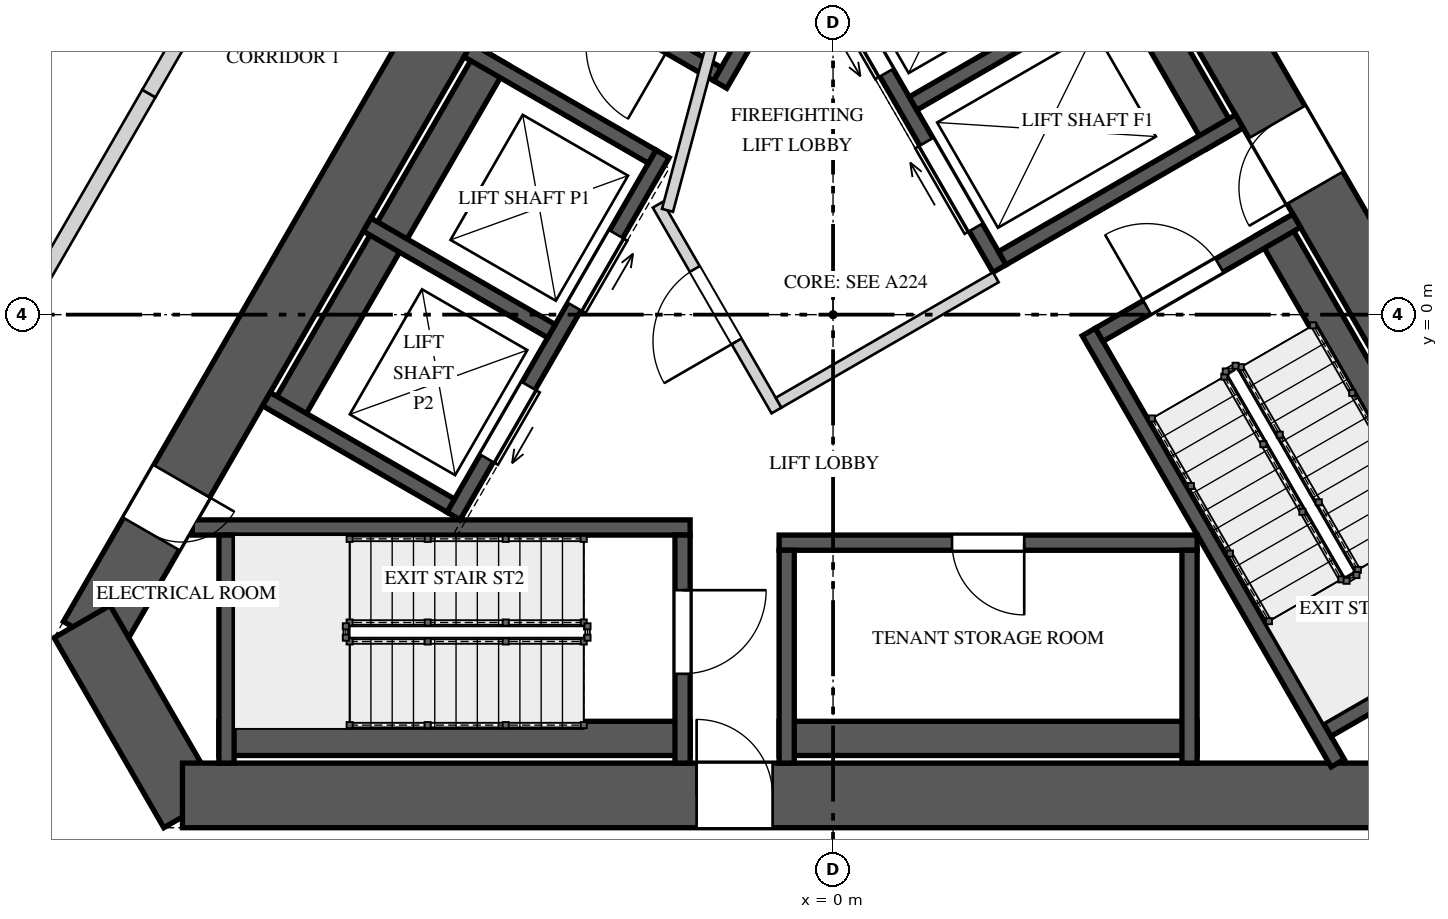
"""IFC4 building model, lengths in metres.
Left out: names, types, materials, properties, quantities, classifications, styles, units other than length and angle.
Written with IfcOpenShell. Run it as: python <this file> out.ifc"""

import sys

from ifc_helpers import new_model, si_unit, direction, frame, frame_2d, origin, place, context, subcontext, project, spatial, rectangle, extrude, element, fill, save


model = new_model("IFC4")
c1 = context("Model", 3, precision=1e-05, world=origin(), true_north=direction((0.0, 1.0)))
c2 = subcontext(c1, "Body", "Model", "MODEL_VIEW")
j1 = project(units=[si_unit("LENGTHUNIT", "METRE"), si_unit("PLANEANGLEUNIT", "RADIAN")], contexts=[c1])
p1 = place(None, origin())
s1 = spatial("IfcSite", under=j1, at=p1, CompositionType="ELEMENT")
p2 = place(p1, origin())
s2 = spatial("IfcBuilding", under=s1, at=p2, CompositionType="ELEMENT")
p3 = place(p2, frame((0.0, 0.0, 162.8)))
s3 = spatial("IfcBuildingStorey", under=s2, at=p3, CompositionType="ELEMENT", Elevation=162.8)
p4 = place(p3, frame((-1.198, 10.575, 0.0), z_axis=(0.0, 0.0, 1.0), x_axis=(-0.499995289315, -0.866028123483, 0.0)))
e1 = element("IfcWall", 1, at=p4, inside=s3, PredefinedType="SHEAR", context=c2, shape_type="SweptSolid", body=[
    extrude(rectangle(XDim=17.118, YDim=0.85, at=frame_2d((8.559, 0.0))), origin(), (0.0, 0.0, 1.0), 4.0),
])
p5 = place(p4, frame((6.764, 0.0, 0.0)))
e2 = element("IfcOpeningElement", 2, at=p5, cuts=e1, PredefinedType="OPENING", context=c2, shape_type="SweptSolid", body=[
    extrude(rectangle(XDim=1.0, YDim=2.4, at=frame_2d((0.5, 1.2))), frame((0.0, 0.435, 0.0), z_axis=(0.0, -1.0, 0.0), x_axis=(1.0, 0.0, 0.0)), (0.0, 0.0, 1.0), 0.87),
])
p6 = place(p4, frame((14.742, 0.0, 0.0)))
e3 = element("IfcOpeningElement", 3, at=p6, cuts=e1, PredefinedType="OPENING", context=c2, shape_type="SweptSolid", body=[
    extrude(rectangle(XDim=0.8, YDim=2.1, at=frame_2d((0.4, 1.05))), frame((0.0, 0.435, 0.0), z_axis=(0.0, -1.0, 0.0), x_axis=(1.0, 0.0, 0.0)), (0.0, 0.0, 1.0), 0.87),
])
p7 = place(p3, frame((-9.88, -4.038, 0.0), z_axis=(0.0, 0.0, 1.0), x_axis=(0.499995765644, -0.866027848477, 0.0)))
e4 = element("IfcWall", 4, at=p7, inside=s3, PredefinedType="SHEAR", context=c2, shape_type="SweptSolid", body=[
    extrude(rectangle(XDim=2.887, YDim=0.85, at=frame_2d((1.443, 0.0))), origin(), (0.0, 0.0, 1.0), 4.0),
])
p8 = place(p3, frame((-8.559, -6.325, 0.0), z_axis=(0.0, 0.0, 1.0), x_axis=(1.0, 0.0, 0.0)))
e5 = element("IfcWall", 5, at=p8, inside=s3, PredefinedType="SHEAR", context=c2, shape_type="SweptSolid", body=[
    extrude(rectangle(XDim=17.118, YDim=0.85, at=frame_2d((8.559, 0.0))), origin(), (0.0, 0.0, 1.0), 4.0),
])
p9 = place(p8, frame((6.764, 0.0, 0.0)))
e6 = element("IfcOpeningElement", 6, at=p9, cuts=e5, PredefinedType="OPENING", context=c2, shape_type="SweptSolid", body=[
    extrude(rectangle(XDim=1.0, YDim=2.4, at=frame_2d((0.5, 1.2))), frame((0.0, 0.435, 0.0), z_axis=(0.0, -1.0, 0.0), x_axis=(1.0, 0.0, 0.0)), (0.0, 0.0, 1.0), 0.87),
])
p10 = place(p3, frame((9.757, -4.25, 0.0), z_axis=(0.0, 0.0, 1.0), x_axis=(-0.499995289315, 0.866028123483, 0.0)))
e7 = element("IfcWall", 7, at=p10, inside=s3, PredefinedType="SHEAR", context=c2, shape_type="SweptSolid", body=[
    extrude(rectangle(XDim=17.118, YDim=0.85, at=frame_2d((8.559, 0.0))), origin(), (0.0, 0.0, 1.0), 4.0),
])
p11 = place(p10, frame((6.834, 0.0, 0.0)))
e8 = element("IfcOpeningElement", 8, at=p11, cuts=e7, PredefinedType="OPENING", context=c2, shape_type="SweptSolid", body=[
    extrude(rectangle(XDim=1.0, YDim=2.4, at=frame_2d((0.5, 1.2))), frame((0.0, 0.435, 0.0), z_axis=(0.0, -1.0, 0.0), x_axis=(1.0, 0.0, 0.0)), (0.0, 0.0, 1.0), 0.87),
])
p12 = place(p3, frame((1.79, 8.7, 0.0), z_axis=(0.0, 0.0, 1.0), x_axis=(-0.499999959354, -0.866025427251, 0.0)))
e9 = element("IfcWall", 9, at=p12, inside=s3, PredefinedType="SOLIDWALL", context=c2, shape_type="SweptSolid", body=[
    extrude(rectangle(XDim=6.549, YDim=0.2, at=frame_2d((3.275, 0.0))), origin(), (0.0, 0.0, 1.0), 3.65),
])
p13 = place(p3, frame((-1.521, 3.165, 0.0), z_axis=(0.0, 0.0, 1.0), x_axis=(-0.866031096941, 0.499990139034, 0.0)))
e10 = element("IfcWall", 10, at=p13, inside=s3, PredefinedType="SOLIDWALL", context=c2, shape_type="SweptSolid", body=[
    extrude(rectangle(XDim=3.0, YDim=0.2, at=frame_2d((1.5, 0.0))), origin(), (0.0, 0.0, 1.0), 3.65),
])
p14 = place(p13, frame((0.725, 0.0, 0.0)))
e11 = element("IfcOpeningElement", 11, at=p14, cuts=e10, PredefinedType="OPENING", context=c2, shape_type="SweptSolid", body=[
    extrude(rectangle(XDim=1.1, YDim=2.4, at=frame_2d((0.55, 1.2))), frame((0.0, 0.11, 0.0), z_axis=(0.0, -1.0, 0.0), x_axis=(1.0, 0.0, 0.0)), (0.0, 0.0, 1.0), 0.22),
])
p15 = place(p3, frame((-8.08, -5.575, 0.0), z_axis=(0.0, 0.0, 1.0), x_axis=(1.0, 0.0, 0.0)))
e12 = element("IfcWall", 12, at=p15, inside=s3, PredefinedType="SOLIDWALL", context=c2, shape_type="SweptSolid", body=[
    extrude(rectangle(XDim=6.2, YDim=0.45, at=frame_2d((3.1, 0.0))), origin(), (0.0, 0.0, 1.0), 3.65),
])
p16 = place(p3, frame((-8.429, -2.8, 0.0), z_axis=(0.0, 0.0, 1.0), x_axis=(1.0, 0.0, 0.0)))
e13 = element("IfcWall", 13, at=p16, inside=s3, PredefinedType="SOLIDWALL", context=c2, shape_type="SweptSolid", body=[
    extrude(rectangle(XDim=6.549, YDim=0.2, at=frame_2d((3.275, 0.0))), origin(), (0.0, 0.0, 1.0), 3.65),
])
p17 = place(p3, frame((-7.98, -2.9, 0.0), z_axis=(0.0, 0.0, 1.0), x_axis=(0.0, -1.0, 0.0)))
e14 = element("IfcWall", 14, at=p17, inside=s3, PredefinedType="SOLIDWALL", context=c2, shape_type="SweptSolid", body=[
    extrude(rectangle(XDim=3.0, YDim=0.2, at=frame_2d((1.5, 0.0))), origin(), (0.0, 0.0, 1.0), 3.65),
])
p18 = place(p3, frame((-1.98, -2.9, 0.0), z_axis=(0.0, 0.0, 1.0), x_axis=(0.0, -1.0, 0.0)))
e15 = element("IfcWall", 15, at=p18, inside=s3, PredefinedType="SOLIDWALL", context=c2, shape_type="SweptSolid", body=[
    extrude(rectangle(XDim=3.0, YDim=0.2, at=frame_2d((1.5, 0.0))), origin(), (0.0, 0.0, 1.0), 3.65),
])
p19 = place(p18, frame((0.725, 0.0, 0.0)))
e16 = element("IfcOpeningElement", 16, at=p19, cuts=e15, PredefinedType="OPENING", context=c2, shape_type="SweptSolid", body=[
    extrude(rectangle(XDim=1.1, YDim=2.4, at=frame_2d((0.55, 1.2))), frame((0.0, 0.11, 0.0), z_axis=(0.0, -1.0, 0.0), x_axis=(1.0, 0.0, 0.0)), (0.0, 0.0, 1.0), 0.22),
])
p20 = place(p3, frame((8.868, -4.21, 0.0), z_axis=(0.0, 0.0, 1.0), x_axis=(-0.500009909098, 0.866019682689, 0.0)))
e17 = element("IfcWall", 17, at=p20, inside=s3, PredefinedType="SOLIDWALL", context=c2, shape_type="SweptSolid", body=[
    extrude(rectangle(XDim=6.2, YDim=0.45, at=frame_2d((3.1, 0.0))), origin(), (0.0, 0.0, 1.0), 3.65),
])
p21 = place(p3, frame((6.64, -5.9, 0.0), z_axis=(0.0, 0.0, 1.0), x_axis=(-0.499999959354, 0.866025427251, 0.0)))
e18 = element("IfcWall", 18, at=p21, inside=s3, PredefinedType="SOLIDWALL", context=c2, shape_type="SweptSolid", body=[
    extrude(rectangle(XDim=6.549, YDim=0.2, at=frame_2d((3.275, 0.0))), origin(), (0.0, 0.0, 1.0), 3.65),
])
p22 = place(p3, frame((6.501, -5.461, 0.0), z_axis=(0.0, 0.0, 1.0), x_axis=(0.866031096941, 0.499990139034, 0.0)))
e19 = element("IfcWall", 19, at=p22, inside=s3, PredefinedType="SOLIDWALL", context=c2, shape_type="SweptSolid", body=[
    extrude(rectangle(XDim=3.0, YDim=0.2, at=frame_2d((1.5, 0.0))), origin(), (0.0, 0.0, 1.0), 3.65),
])
p23 = place(p3, frame((3.501, -0.265, 0.0), z_axis=(0.0, 0.0, 1.0), x_axis=(0.866031096941, 0.499990139034, 0.0)))
e20 = element("IfcWall", 20, at=p23, inside=s3, PredefinedType="SOLIDWALL", context=c2, shape_type="SweptSolid", body=[
    extrude(rectangle(XDim=3.0, YDim=0.2, at=frame_2d((1.5, 0.0))), origin(), (0.0, 0.0, 1.0), 3.65),
])
p24 = place(p23, frame((0.725, 0.0, 0.0)))
e21 = element("IfcOpeningElement", 21, at=p24, cuts=e20, PredefinedType="OPENING", context=c2, shape_type="SweptSolid", body=[
    extrude(rectangle(XDim=1.1, YDim=2.4, at=frame_2d((0.55, 1.2))), frame((0.0, 0.11, 0.0), z_axis=(0.0, -1.0, 0.0), x_axis=(1.0, 0.0, 0.0)), (0.0, 0.0, 1.0), 0.22),
])
p25 = place(p3, frame((-2.243, 2.115, 0.0), z_axis=(0.0, 0.0, 1.0), x_axis=(-0.499996545922, -0.866027397988, 0.0)))
e22 = element("IfcWall", 22, at=p25, inside=s3, PredefinedType="SOLIDWALL", context=c2, shape_type="SweptSolid", body=[
    extrude(rectangle(XDim=5.5, YDim=0.2, at=frame_2d((2.75, 0.0))), origin(), (0.0, 0.0, 1.0), 3.65),
])
p26 = place(p25, frame((1.22, 0.0, 0.0)))
e23 = element("IfcOpeningElement", 23, at=p26, cuts=e22, PredefinedType="OPENING", context=c2, shape_type="SweptSolid", body=[
    extrude(rectangle(XDim=1.1, YDim=2.1, at=frame_2d((0.55, 1.05))), frame((0.0, 0.11, 0.0), z_axis=(0.0, -1.0, 0.0), x_axis=(1.0, 0.0, 0.0)), (0.0, 0.0, 1.0), 0.22),
])
p27 = place(p25, frame((3.525, 0.0, 0.0)))
e24 = element("IfcOpeningElement", 24, at=p27, cuts=e22, PredefinedType="OPENING", context=c2, shape_type="SweptSolid", body=[
    extrude(rectangle(XDim=1.1, YDim=2.1, at=frame_2d((0.55, 1.05))), frame((0.0, 0.11, 0.0), z_axis=(0.0, -1.0, 0.0), x_axis=(1.0, 0.0, 0.0)), (0.0, 0.0, 1.0), 0.22),
])
p28 = place(p3, frame((-4.473, 3.402, 0.0), z_axis=(0.0, 0.0, 1.0), x_axis=(-0.499996545922, -0.866027397988, 0.0)))
e25 = element("IfcWall", 25, at=p28, inside=s3, PredefinedType="SOLIDWALL", context=c2, shape_type="SweptSolid", body=[
    extrude(rectangle(XDim=5.5, YDim=0.45, at=frame_2d((2.75, 0.0))), origin(), (0.0, 0.0, 1.0), 3.65),
])
p29 = place(p3, frame((-2.38, 2.078, 0.0), z_axis=(0.0, 0.0, 1.0), x_axis=(-0.866034573852, 0.49998411664, 0.0)))
e26 = element("IfcWall", 26, at=p29, inside=s3, PredefinedType="SOLIDWALL", context=c2, shape_type="SweptSolid", body=[
    extrude(rectangle(XDim=2.8, YDim=0.2, at=frame_2d((1.4, 0.0))), origin(), (0.0, 0.0, 1.0), 3.65),
])
p30 = place(p3, frame((-3.705, -0.217, 0.0), z_axis=(0.0, 0.0, 1.0), x_axis=(-0.866018616679, 0.500011755427, 0.0)))
e27 = element("IfcWall", 27, at=p30, inside=s3, PredefinedType="SOLIDWALL", context=c2, shape_type="SweptSolid", body=[
    extrude(rectangle(XDim=2.8, YDim=0.2, at=frame_2d((1.4, 0.0))), origin(), (0.0, 0.0, 1.0), 3.65),
])
p31 = place(p3, frame((-5.03, -2.512, 0.0), z_axis=(0.0, 0.0, 1.0), x_axis=(-0.865996816683, 0.500049511043, 0.0)))
e28 = element("IfcWall", 28, at=p31, inside=s3, PredefinedType="SOLIDWALL", context=c2, shape_type="SweptSolid", body=[
    extrude(rectangle(XDim=2.8, YDim=0.2, at=frame_2d((1.4, 0.0))), origin(), (0.0, 0.0, 1.0), 3.65),
])
p32 = place(p3, frame((4.79, -3.0, 0.0), z_axis=(0.0, 0.0, 1.0), x_axis=(-1.0, 0.0, 0.0)))
e29 = element("IfcWall", 29, at=p32, inside=s3, PredefinedType="SOLIDWALL", context=c2, shape_type="SweptSolid", body=[
    extrude(rectangle(XDim=5.5, YDim=0.2, at=frame_2d((2.75, 0.0))), origin(), (0.0, 0.0, 1.0), 3.65),
])
p33 = place(p32, frame((2.275, 0.0, 0.0)))
e30 = element("IfcOpeningElement", 30, at=p33, cuts=e29, PredefinedType="OPENING", context=c2, shape_type="SweptSolid", body=[
    extrude(rectangle(XDim=0.95, YDim=2.4, at=frame_2d((0.475, 1.2))), frame((0.0, 0.11, 0.0), z_axis=(0.0, -1.0, 0.0), x_axis=(1.0, 0.0, 0.0)), (0.0, 0.0, 1.0), 0.22),
])
p34 = place(p3, frame((-0.71, -5.575, 0.0), z_axis=(0.0, 0.0, 1.0), x_axis=(1.0, 0.0, 0.0)))
e31 = element("IfcWall", 31, at=p34, inside=s3, PredefinedType="SOLIDWALL", context=c2, shape_type="SweptSolid", body=[
    extrude(rectangle(XDim=5.5, YDim=0.45, at=frame_2d((2.75, 0.0))), origin(), (0.0, 0.0, 1.0), 3.65),
])
for number, where, z_axis, x_axis in (
    (32, (-0.61, -3.1, 0.0), (0.0, 0.0, 1.0), (0.0, -1.0, 0.0)),
    (33, (4.69, -3.1, 0.0), (0.0, 0.0, 1.0), (0.0, -1.0, 0.0)),
):
    element("IfcWall", number, at=place(p3, frame(where, z_axis=z_axis, x_axis=x_axis)), inside=s3, PredefinedType="SOLIDWALL", context=c2, shape_type="SweptSolid", body=[
        extrude(rectangle(XDim=2.8, YDim=0.2, at=frame_2d((1.4, 0.0))), origin(), (0.0, 0.0, 1.0), 3.65),
    ])
p35 = place(p3, frame((2.19, 0.606, 0.0), z_axis=(0.0, 0.0, 1.0), x_axis=(-0.500002801628, 0.866023786258, 0.0)))
e34 = element("IfcWall", 34, at=p35, inside=s3, PredefinedType="SOLIDWALL", context=c2, shape_type="SweptSolid", body=[
    extrude(rectangle(XDim=4.9, YDim=0.2, at=frame_2d((2.45, 0.0))), origin(), (0.0, 0.0, 1.0), 3.65),
])
p36 = place(p35, frame((0.625, 0.0, 0.0)))
e35 = element("IfcOpeningElement", 35, at=p36, cuts=e34, PredefinedType="OPENING", context=c2, shape_type="SweptSolid", body=[
    extrude(rectangle(XDim=1.3, YDim=2.1, at=frame_2d((0.65, 1.05))), frame((0.0, 0.11, 0.0), z_axis=(0.0, -1.0, 0.0), x_axis=(1.0, 0.0, 0.0)), (0.0, 0.0, 1.0), 0.22),
])
p37 = place(p35, frame((2.975, 0.0, 0.0)))
e36 = element("IfcOpeningElement", 36, at=p37, cuts=e34, PredefinedType="OPENING", context=c2, shape_type="SweptSolid", body=[
    extrude(rectangle(XDim=1.3, YDim=2.1, at=frame_2d((0.65, 1.05))), frame((0.0, 0.11, 0.0), z_axis=(0.0, -1.0, 0.0), x_axis=(1.0, 0.0, 0.0)), (0.0, 0.0, 1.0), 0.22),
])
p38 = place(p3, frame((5.113, 2.294, 0.0), z_axis=(0.0, 0.0, 1.0), x_axis=(-0.500002801628, 0.866023786258, 0.0)))
e37 = element("IfcWall", 37, at=p38, inside=s3, PredefinedType="SOLIDWALL", context=c2, shape_type="SweptSolid", body=[
    extrude(rectangle(XDim=4.9, YDim=0.45, at=frame_2d((2.45, 0.0))), origin(), (0.0, 0.0, 1.0), 3.65),
])
for number, where, z_axis, x_axis in (
    (38, (2.227, 0.743, 0.0), (0.0, 0.0, 1.0), (0.866, 0.5, 0.0)),
    (39, (1.052, 2.778, 0.0), (0.0, 0.0, 1.0), (0.866, 0.5, 0.0)),
):
    element("IfcWall", number, at=place(p3, frame(where, z_axis=z_axis, x_axis=x_axis)), inside=s3, PredefinedType="SOLIDWALL", context=c2, shape_type="SweptSolid", body=[
        extrude(rectangle(XDim=3.6, YDim=0.2, at=frame_2d((1.8, 0.0))), origin(), (0.0, 0.0, 1.0), 3.65),
    ])
p39 = place(p3, frame((-0.744, -1.261, 0.0), z_axis=(0.0, 0.0, 1.0), x_axis=(-0.500004234368, 0.866022959057, 0.0)))
e40 = element("IfcWall", 40, at=p39, inside=s3, PredefinedType="PARTITIONING", context=c2, shape_type="SweptSolid", body=[
    extrude(rectangle(XDim=3.125, YDim=0.15, at=frame_2d((1.562, 0.0))), origin(), (0.0, 0.0, 1.0), 3.65),
])
p40 = place(p39, frame((1.05, 0.0, 0.0)))
e41 = element("IfcOpeningElement", 41, at=p40, cuts=e40, PredefinedType="OPENING", context=c2, shape_type="SweptSolid", body=[
    extrude(rectangle(XDim=1.1, YDim=2.4, at=frame_2d((0.55, 1.2))), frame((0.0, 0.085, 0.0), z_axis=(0.0, -1.0, 0.0), x_axis=(1.0, 0.0, 0.0)), (0.0, 0.0, 1.0), 0.17),
])
p41 = place(p3, frame((-0.717, -1.159, 0.0), z_axis=(0.0, 0.0, 1.0), x_axis=(0.866008176907, 0.50002983664, 0.0)))
e42 = element("IfcWall", 42, at=p41, inside=s3, PredefinedType="PARTITIONING", context=c2, shape_type="SweptSolid", body=[
    extrude(rectangle(XDim=3.3, YDim=0.15, at=frame_2d((1.65, 0.0))), origin(), (0.0, 0.0, 1.0), 3.65),
])
p42 = place(p3, frame((-2.178, 1.372, 0.0), z_axis=(0.0, 0.0, 1.0), x_axis=(0.258808958833, 0.96592852884, 0.0)))
e43 = element("IfcWall", 43, at=p42, inside=s3, PredefinedType="PARTITIONING", context=c2, shape_type="SweptSolid", body=[
    extrude(rectangle(XDim=2.903, YDim=0.15, at=frame_2d((1.451, 0.0))), origin(), (0.0, 0.0, 1.0), 3.65),
])
p43 = place(p3, frame((-11.155, -0.821, 0.0), z_axis=(0.0, 0.0, 1.0), x_axis=(0.499992344383, 0.866029823712, 0.0)))
e44 = element("IfcWall", 44, at=p43, inside=s3, PredefinedType="SOLIDWALL", context=c2, shape_type="SweptSolid", body=[
    extrude(rectangle(XDim=4.307, YDim=0.2, at=frame_2d((2.153, 0.0))), origin(), (0.0, 0.0, 1.0), 3.65),
])
p44 = place(p3, frame((-9.001, 2.909, 0.0), z_axis=(0.0, 0.0, 1.0), x_axis=(0.50012879774, 0.865951029603, 0.0)))
e45 = element("IfcWall", 45, at=p44, inside=s3, PredefinedType="SOLIDWALL", context=c2, shape_type="SweptSolid", body=[
    extrude(rectangle(XDim=0.711, YDim=0.2, at=frame_2d((0.355, 0.0))), origin(), (0.0, 0.0, 1.0), 2.95),
])
p45 = place(p19, origin())
e46 = element("IfcDoor", 46, at=p45, inside=s3, OperationType="SINGLE_SWING_LEFT", PredefinedType="DOOR", context=c2, shape_type="SweptSolid", body=[
    extrude(rectangle(XDim=1.1, YDim=2.4, at=frame_2d((0.55, 1.2))), frame((0.0, 0.025, 0.0), z_axis=(0.0, -1.0, 0.0), x_axis=(1.0, 0.0, 0.0)), (0.0, 0.0, 1.0), 0.05),
])
fill(e16, e46)
p46 = place(p24, origin())
e47 = element("IfcDoor", 47, at=p46, inside=s3, OperationType="SINGLE_SWING_RIGHT", PredefinedType="DOOR", context=c2, shape_type="SweptSolid", body=[
    extrude(rectangle(XDim=1.1, YDim=2.4, at=frame_2d((0.55, 1.2))), frame((0.0, 0.025, 0.0), z_axis=(0.0, -1.0, 0.0), x_axis=(1.0, 0.0, 0.0)), (0.0, 0.0, 1.0), 0.05),
])
fill(e21, e47)
p47 = place(p26, origin())
e48 = element("IfcDoor", 48, at=p47, inside=s3, OperationType="SLIDING_TO_LEFT", PredefinedType="DOOR", context=c2, shape_type="SweptSolid", body=[
    extrude(rectangle(XDim=1.1, YDim=2.1, at=frame_2d((0.55, 1.05))), frame((0.0, 0.025, 0.0), z_axis=(0.0, -1.0, 0.0), x_axis=(1.0, 0.0, 0.0)), (0.0, 0.0, 1.0), 0.05),
])
fill(e23, e48)
p48 = place(p27, origin())
e49 = element("IfcDoor", 49, at=p48, inside=s3, OperationType="SLIDING_TO_RIGHT", PredefinedType="DOOR", context=c2, shape_type="SweptSolid", body=[
    extrude(rectangle(XDim=1.1, YDim=2.1, at=frame_2d((0.55, 1.05))), frame((0.0, 0.025, 0.0), z_axis=(0.0, -1.0, 0.0), x_axis=(1.0, 0.0, 0.0)), (0.0, 0.0, 1.0), 0.05),
])
fill(e24, e49)
p49 = place(p33, origin())
e50 = element("IfcDoor", 50, at=p49, inside=s3, OperationType="SINGLE_SWING_LEFT", PredefinedType="DOOR", context=c2, shape_type="SweptSolid", body=[
    extrude(rectangle(XDim=0.95, YDim=2.4, at=frame_2d((0.475, 1.2))), frame((0.0, 0.025, 0.0), z_axis=(0.0, -1.0, 0.0), x_axis=(1.0, 0.0, 0.0)), (0.0, 0.0, 1.0), 0.05),
])
fill(e30, e50)
p50 = place(p36, origin())
e51 = element("IfcDoor", 51, at=p50, inside=s3, OperationType="SLIDING_TO_RIGHT", PredefinedType="DOOR", context=c2, shape_type="SweptSolid", body=[
    extrude(rectangle(XDim=1.3, YDim=2.1, at=frame_2d((0.65, 1.05))), frame((0.0, 0.025, 0.0), z_axis=(0.0, -1.0, 0.0), x_axis=(1.0, 0.0, 0.0)), (0.0, 0.0, 1.0), 0.05),
])
fill(e35, e51)
p51 = place(p37, origin())
e52 = element("IfcDoor", 52, at=p51, inside=s3, OperationType="SLIDING_TO_LEFT", PredefinedType="DOOR", context=c2, shape_type="SweptSolid", body=[
    extrude(rectangle(XDim=1.3, YDim=2.1, at=frame_2d((0.65, 1.05))), frame((0.0, 0.025, 0.0), z_axis=(0.0, -1.0, 0.0), x_axis=(1.0, 0.0, 0.0)), (0.0, 0.0, 1.0), 0.05),
])
fill(e36, e52)
p52 = place(p40, origin())
e53 = element("IfcDoor", 53, at=p52, inside=s3, OperationType="SINGLE_SWING_RIGHT", PredefinedType="DOOR", context=c2, shape_type="SweptSolid", body=[
    extrude(rectangle(XDim=1.1, YDim=2.4, at=frame_2d((0.55, 1.2))), frame((0.0, 0.025, 0.0), z_axis=(0.0, -1.0, 0.0), x_axis=(1.0, 0.0, 0.0)), (0.0, 0.0, 1.0), 0.05),
])
fill(e41, e53)
p53 = place(p9, origin())
e54 = element("IfcDoor", 54, at=p53, inside=s3, OperationType="SINGLE_SWING_RIGHT", PredefinedType="DOOR", context=c2, shape_type="SweptSolid", body=[
    extrude(rectangle(XDim=1.0, YDim=2.4, at=frame_2d((0.5, 1.2))), frame((0.0, 0.025, 0.0), z_axis=(0.0, -1.0, 0.0), x_axis=(1.0, 0.0, 0.0)), (0.0, 0.0, 1.0), 0.05),
])
fill(e6, e54)
p54 = place(p11, origin())
e55 = element("IfcDoor", 55, at=p54, inside=s3, OperationType="SINGLE_SWING_LEFT", PredefinedType="DOOR", context=c2, shape_type="SweptSolid", body=[
    extrude(rectangle(XDim=1.0, YDim=2.4, at=frame_2d((0.5, 1.2))), frame((0.0, 0.025, 0.0), z_axis=(0.0, -1.0, 0.0), x_axis=(1.0, 0.0, 0.0)), (0.0, 0.0, 1.0), 0.05),
])
fill(e8, e55)
p55 = place(p6, origin())
e56 = element("IfcDoor", 56, at=p55, inside=s3, OperationType="SINGLE_SWING_RIGHT", PredefinedType="DOOR", context=c2, shape_type="SweptSolid", body=[
    extrude(rectangle(XDim=0.8, YDim=2.1, at=frame_2d((0.4, 1.05))), frame((0.0, 0.025, 0.0), z_axis=(0.0, -1.0, 0.0), x_axis=(1.0, 0.0, 0.0)), (0.0, 0.0, 1.0), 0.05),
])
fill(e3, e56)
save(model, sys.argv[1])
